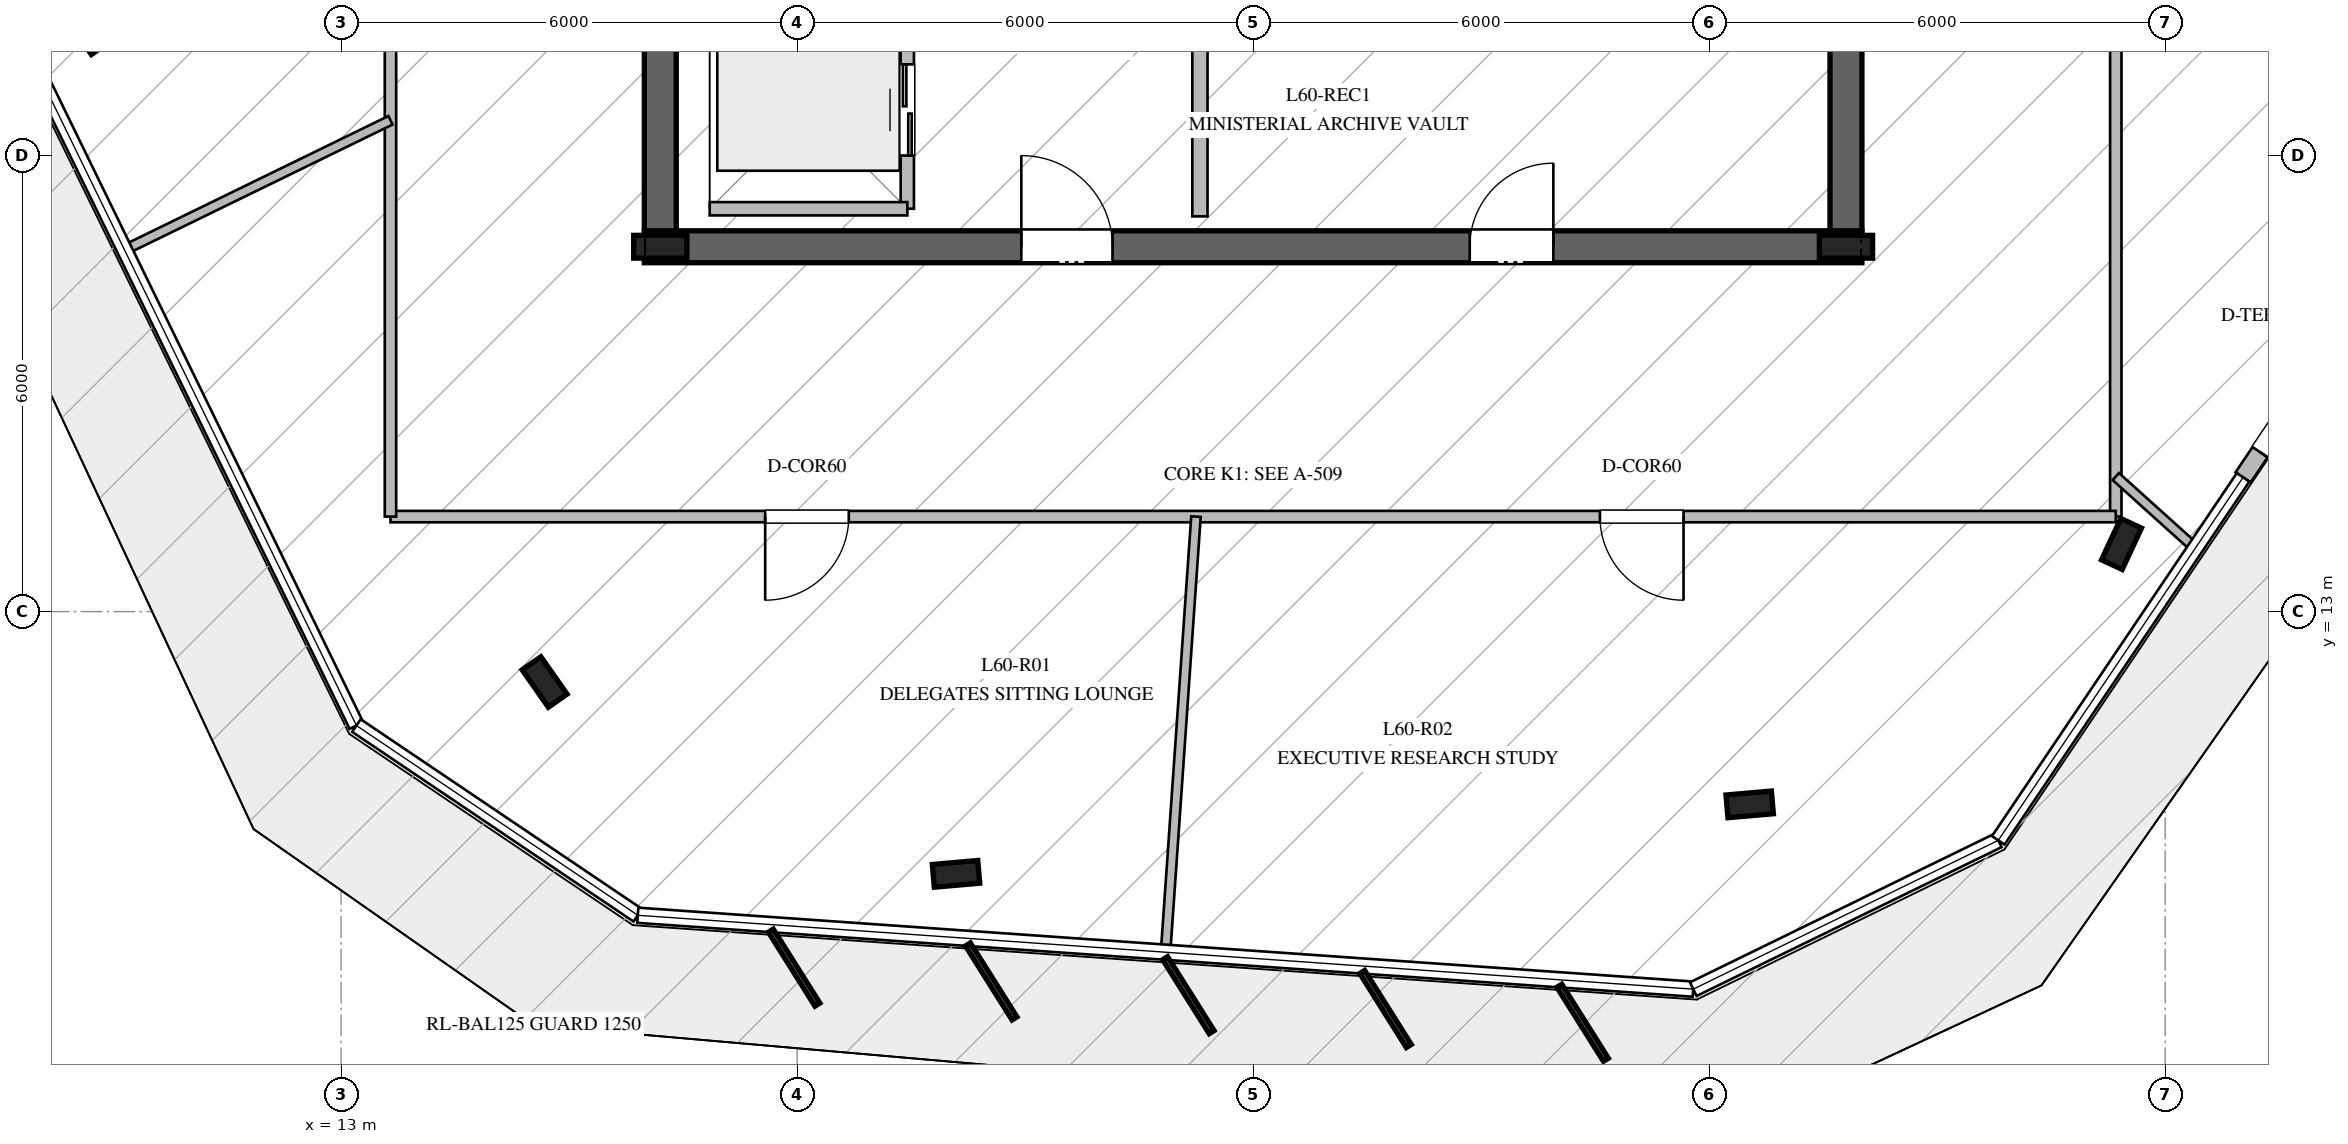
"""IFC4 building model, lengths in metres.
Left out: names, types, materials, properties, quantities, classifications, styles, units other than length and angle.
Written with IfcOpenShell. Run it as: python <this file> out.ifc"""

import sys

from ifc_helpers import new_model, si_unit, direction, frame, frame_2d, origin, origin_2d, place, context, subcontext, project, spatial, rectangle, i_section, extrude, element, fill, save


model = new_model("IFC4")
c1 = context("Model", 3, precision=1e-05, world=origin(), true_north=direction((0.0, 1.0)))
c2 = subcontext(c1, "Body", "Model", "MODEL_VIEW")
j1 = project(units=[si_unit("LENGTHUNIT", "METRE"), si_unit("PLANEANGLEUNIT", "RADIAN")], contexts=[c1])
p1 = place(None, origin())
s1 = spatial("IfcSite", under=j1, at=p1, CompositionType="ELEMENT")
p2 = place(p1, origin())
s2 = spatial("IfcBuilding", under=s1, at=p2, CompositionType="ELEMENT")
p3 = place(p2, frame((0.0, 0.0, 250.2)))
s3 = spatial("IfcBuildingStorey", under=s2, at=p3, CompositionType="ELEMENT", Elevation=250.2)
p4 = place(p3, frame((16.99, 17.8, 0.0), z_axis=(0.0, 0.0, 1.0), x_axis=(1.0, 0.0, 0.0)))
e1 = element("IfcWall", 1, at=p4, inside=s3, PredefinedType="SHEAR", context=c2, shape_type="SweptSolid", body=[
    extrude(rectangle(XDim=16.02, YDim=0.42, at=frame_2d((8.01, 0.0))), origin(), (0.0, 0.0, 1.0), 3.78),
])
p5 = place(p4, frame((4.96, 0.0, 0.0)))
e2 = element("IfcOpeningElement", 2, at=p5, cuts=e1, PredefinedType="OPENING", context=c2, shape_type="SweptSolid", body=[
    extrude(rectangle(XDim=1.2, YDim=2.25, at=frame_2d((0.6, 1.125))), frame((0.0, 0.22, 0.0), z_axis=(0.0, -1.0, 0.0), x_axis=(1.0, 0.0, 0.0)), (0.0, 0.0, 1.0), 0.44),
])
p6 = place(p4, frame((10.86, 0.0, 0.0)))
e3 = element("IfcOpeningElement", 3, at=p6, cuts=e1, PredefinedType="OPENING", context=c2, shape_type="SweptSolid", body=[
    extrude(rectangle(XDim=1.1, YDim=2.2, at=frame_2d((0.55, 1.1))), frame((0.0, 0.22, 0.0), z_axis=(0.0, -1.0, 0.0), x_axis=(1.0, 0.0, 0.0)), (0.0, 0.0, 1.0), 0.44),
])
p7 = place(p3, frame((17.2, 31.99, 0.0), z_axis=(0.0, 0.0, 1.0), x_axis=(0.0, -1.0, 0.0)))
e4 = element("IfcWall", 4, at=p7, inside=s3, PredefinedType="SHEAR", context=c2, shape_type="SweptSolid", body=[
    extrude(rectangle(XDim=13.98, YDim=0.42, at=frame_2d((6.99, 0.0))), origin(), (0.0, 0.0, 1.0), 3.78),
])
p8 = place(p7, frame((2.14, 0.0, 0.0)))
e5 = element("IfcOpeningElement", 5, at=p8, cuts=e4, PredefinedType="OPENING", context=c2, shape_type="SweptSolid", body=[
    extrude(rectangle(XDim=1.5, YDim=2.2, at=frame_2d((0.75, 1.1))), frame((0.0, 0.22, 0.0), z_axis=(0.0, -1.0, 0.0), x_axis=(1.0, 0.0, 0.0)), (0.0, 0.0, 1.0), 0.44),
])
p9 = place(p3, frame((32.8, 18.01, 0.0), z_axis=(0.0, 0.0, 1.0), x_axis=(0.0, 1.0, 0.0)))
e6 = element("IfcWall", 6, at=p9, inside=s3, PredefinedType="SHEAR", context=c2, shape_type="SweptSolid", body=[
    extrude(rectangle(XDim=13.98, YDim=0.42, at=frame_2d((6.99, 0.0))), origin(), (0.0, 0.0, 1.0), 3.78),
])
for number, where, z_axis, x_axis in (
    (7, (17.2, 17.8, 0.0), (0.0, 0.0, 1.0), (1.0, 0.0, 0.0)),
    (8, (32.8, 17.8, 0.0), (0.0, 0.0, 1.0), (1.0, 0.0, 0.0)),
):
    element("IfcColumn", number, at=place(p3, frame(where, z_axis=z_axis, x_axis=x_axis)), inside=s3, PredefinedType="COLUMN", context=c2, shape_type="SweptSolid", body=[
        extrude(i_section(OverallWidth=0.3, OverallDepth=0.7, WebThickness=0.017, FlangeThickness=0.032, at=origin_2d()), origin(), (0.0, 0.0, 1.0), 4.0),
    ])
for number, where, z_axis, x_axis in (
    (9, (15.678, 12.074, -0.27), (0.0, 0.0, 1.0), (-0.574, 0.819, 0.0)),
    (10, (21.091, 9.55, -0.27), (0.0, 0.0, 1.0), (0.996, 0.087, 0.0)),
    (11, (31.533, 10.464, -0.27), (0.0, 0.0, 1.0), (0.996, 0.087, 0.0)),
    (12, (36.425, 13.89, -0.27), (0.0, 0.0, 1.0), (0.423, 0.906, 0.0)),
):
    element("IfcColumn", number, at=place(p3, frame(where, z_axis=z_axis, x_axis=x_axis)), inside=s3, PredefinedType="COLUMN", context=c2, shape_type="SweptSolid", body=[
        extrude(i_section(OverallWidth=0.3, OverallDepth=0.6, WebThickness=0.015, FlangeThickness=0.03, at=origin_2d()), origin(), (0.0, 0.0, 1.0), 4.27),
    ])
p10 = place(p3, frame((38.025, 14.766, 0.0), z_axis=(0.0, 0.0, 1.0), x_axis=(0.559128660759, 0.82908090119, 0.0)))
e13 = element("IfcWall", 13, at=p10, inside=s3, PredefinedType="STANDARD", context=c2, shape_type="SweptSolid", body=[
    extrude(rectangle(XDim=2.4, YDim=0.24, at=frame_2d((1.2, 0.0))), origin(), (0.0, 0.0, 1.0), 3.78),
])
p11 = place(p10, frame((0.4, 0.0, 0.0)))
e14 = element("IfcOpeningElement", 14, at=p11, cuts=e13, PredefinedType="OPENING", context=c2, shape_type="SweptSolid", body=[
    extrude(rectangle(XDim=1.6, YDim=2.25, at=frame_2d((0.8, 1.125))), frame((0.0, 0.13, 0.0), z_axis=(0.0, -1.0, 0.0), x_axis=(1.0, 0.0, 0.0)), (0.0, 0.0, 1.0), 0.26),
])
p12 = place(p3, frame((24.3, 18.2, 0.0), z_axis=(0.0, 0.0, 1.0), x_axis=(0.0, 1.0, 0.0)))
e15 = element("IfcWall", 15, at=p12, inside=s3, PredefinedType="PARTITIONING", context=c2, shape_type="SweptSolid", body=[
    extrude(rectangle(XDim=5.15, YDim=0.2, at=frame_2d((2.575, 0.0))), origin(), (0.0, 0.0, 1.0), 3.78),
])
p13 = place(p3, frame((20.45, 18.3, 0.0), z_axis=(0.0, 0.0, 1.0), x_axis=(0.0, 1.0, 0.0)))
e16 = element("IfcWall", 16, at=p13, inside=s3, PredefinedType="PARTITIONING", context=c2, shape_type="SweptSolid", body=[
    extrude(rectangle(XDim=2.6, YDim=0.175, at=frame_2d((1.3, 0.0))), origin(), (0.0, 0.0, 1.0), 3.78),
])
p14 = place(p13, frame((0.7, 0.0, 0.0)))
e17 = element("IfcOpeningElement", 17, at=p14, cuts=e16, PredefinedType="OPENING", context=c2, shape_type="SweptSolid", body=[
    extrude(rectangle(XDim=1.2, YDim=2.2, at=frame_2d((0.6, 1.1))), frame((0.0, 0.098, 0.0), z_axis=(0.0, -1.0, 0.0), x_axis=(1.0, 0.0, 0.0)), (0.0, 0.0, 1.0), 0.195),
])
p15 = place(p3, frame((17.85, 18.3, 0.0), z_axis=(0.0, 0.0, 1.0), x_axis=(1.0, 0.0, 0.0)))
e18 = element("IfcWall", 18, at=p15, inside=s3, PredefinedType="PARTITIONING", context=c2, shape_type="SweptSolid", body=[
    extrude(rectangle(XDim=2.6, YDim=0.175, at=frame_2d((1.3, 0.0))), origin(), (0.0, 0.0, 1.0), 3.78),
])
p16 = place(p3, frame((36.35, 35.75, 0.0), z_axis=(0.0, 0.0, 1.0), x_axis=(0.0, -1.0, 0.0)))
e19 = element("IfcWall", 19, at=p16, inside=s3, PredefinedType="PARTITIONING", context=c2, shape_type="SweptSolid", body=[
    extrude(rectangle(XDim=21.5, YDim=0.15, at=frame_2d((10.75, 0.0))), origin(), (0.0, 0.0, 1.0), 3.25),
])
p17 = place(p16, frame((13.919, 0.0, 0.0)))
e20 = element("IfcOpeningElement", 20, at=p17, cuts=e19, PredefinedType="OPENING", context=c2, shape_type="SweptSolid", body=[
    extrude(rectangle(XDim=1.1, YDim=2.2, at=frame_2d((0.55, 1.1))), frame((0.0, 0.085, 0.0), z_axis=(0.0, -1.0, 0.0), x_axis=(1.0, 0.0, 0.0)), (0.0, 0.0, 1.0), 0.17),
])
p18 = place(p3, frame((36.35, 14.25, 0.0), z_axis=(0.0, 0.0, 1.0), x_axis=(-1.0, 0.0, 0.0)))
e21 = element("IfcWall", 21, at=p18, inside=s3, PredefinedType="PARTITIONING", context=c2, shape_type="SweptSolid", body=[
    extrude(rectangle(XDim=22.7, YDim=0.15, at=frame_2d((11.35, 0.0))), origin(), (0.0, 0.0, 1.0), 3.28),
])
p19 = place(p18, frame((16.67, 0.0, 0.0)))
e22 = element("IfcOpeningElement", 22, at=p19, cuts=e21, PredefinedType="OPENING", context=c2, shape_type="SweptSolid", body=[
    extrude(rectangle(XDim=1.1, YDim=2.2, at=frame_2d((0.55, 1.1))), frame((0.0, 0.085, 0.0), z_axis=(0.0, -1.0, 0.0), x_axis=(1.0, 0.0, 0.0)), (0.0, 0.0, 1.0), 0.17),
])
p20 = place(p18, frame((5.687, 0.0, 0.0)))
e23 = element("IfcOpeningElement", 23, at=p20, cuts=e21, PredefinedType="OPENING", context=c2, shape_type="SweptSolid", body=[
    extrude(rectangle(XDim=1.1, YDim=2.2, at=frame_2d((0.55, 1.1))), frame((0.0, 0.085, 0.0), z_axis=(0.0, -1.0, 0.0), x_axis=(1.0, 0.0, 0.0)), (0.0, 0.0, 1.0), 0.17),
])
p21 = place(p3, frame((13.65, 14.25, 0.0), z_axis=(0.0, 0.0, 1.0), x_axis=(0.0, 1.0, 0.0)))
e24 = element("IfcWall", 24, at=p21, inside=s3, PredefinedType="PARTITIONING", context=c2, shape_type="SweptSolid", body=[
    extrude(rectangle(XDim=21.5, YDim=0.15, at=frame_2d((10.75, 0.0))), origin(), (0.0, 0.0, 1.0), 3.25),
])
p22 = place(p21, frame((10.11, 0.0, 0.0)))
e25 = element("IfcOpeningElement", 25, at=p22, cuts=e24, PredefinedType="OPENING", context=c2, shape_type="SweptSolid", body=[
    extrude(rectangle(XDim=1.1, YDim=2.2, at=frame_2d((0.55, 1.1))), frame((0.0, 0.085, 0.0), z_axis=(0.0, -1.0, 0.0), x_axis=(1.0, 0.0, 0.0)), (0.0, 0.0, 1.0), 0.17),
])
p23 = place(p3, frame((13.65, 19.464, 0.0), z_axis=(0.0, 0.0, 1.0), x_axis=(-0.898841056679, -0.438274748107, 0.0)))
e26 = element("IfcWall", 26, at=p23, inside=s3, PredefinedType="PARTITIONING", context=c2, shape_type="SweptSolid", body=[
    extrude(rectangle(XDim=3.877, YDim=0.125, at=frame_2d((1.938, 0.0))), origin(), (0.0, 0.0, 1.0), 3.25),
])
p24 = place(p3, frame((24.248, 14.25, 0.0), z_axis=(0.0, 0.0, 1.0), x_axis=(-0.069632781352, -0.997572691968, 0.0)))
e27 = element("IfcWall", 27, at=p24, inside=s3, PredefinedType="PARTITIONING", context=c2, shape_type="SweptSolid", body=[
    extrude(rectangle(XDim=5.729, YDim=0.125, at=frame_2d((2.865, 0.0))), origin(), (0.0, 0.0, 1.0), 3.28),
])
p25 = place(p3, frame((36.35, 14.777, 0.0), z_axis=(0.0, 0.0, 1.0), x_axis=(0.743041331361, -0.669245530346, 0.0)))
e28 = element("IfcWall", 28, at=p25, inside=s3, PredefinedType="PARTITIONING", context=c2, shape_type="SweptSolid", body=[
    extrude(rectangle(XDim=1.393, YDim=0.125, at=frame_2d((0.696, 0.0))), origin(), (0.0, 0.0, 1.0), 3.28),
])
p26 = place(p11, frame((1.6, 0.0, 0.0), z_axis=(0.0, 0.0, 1.0), x_axis=(-1.0, 0.0, 0.0)))
e29 = element("IfcDoor", 29, at=p26, inside=s3, OperationType="DOUBLE_DOOR_SINGLE_SWING", PredefinedType="DOOR", context=c2, shape_type="SweptSolid", body=[
    extrude(rectangle(XDim=1.6, YDim=2.25, at=frame_2d((0.8, 1.125))), frame((0.0, 0.025, 0.0), z_axis=(0.0, -1.0, 0.0), x_axis=(1.0, 0.0, 0.0)), (0.0, 0.0, 1.0), 0.05),
])
fill(e14, e29)
p27 = place(p5, origin())
e30 = element("IfcDoor", 30, at=p27, inside=s3, OperationType="SINGLE_SWING_LEFT", PredefinedType="DOOR", context=c2, shape_type="SweptSolid", body=[
    extrude(rectangle(XDim=1.2, YDim=2.25, at=frame_2d((0.6, 1.125))), frame((0.0, 0.025, 0.0), z_axis=(0.0, -1.0, 0.0), x_axis=(1.0, 0.0, 0.0)), (0.0, 0.0, 1.0), 0.05),
])
fill(e2, e30)
p28 = place(p6, origin())
e31 = element("IfcDoor", 31, at=p28, inside=s3, OperationType="SINGLE_SWING_RIGHT", PredefinedType="DOOR", context=c2, shape_type="SweptSolid", body=[
    extrude(rectangle(XDim=1.1, YDim=2.2, at=frame_2d((0.55, 1.1))), frame((0.0, 0.025, 0.0), z_axis=(0.0, -1.0, 0.0), x_axis=(1.0, 0.0, 0.0)), (0.0, 0.0, 1.0), 0.05),
])
fill(e3, e31)
p29 = place(p14, origin())
e32 = element("IfcDoor", 32, at=p29, inside=s3, OperationType="DOUBLE_DOOR_SLIDING", PredefinedType="DOOR", context=c2, shape_type="SweptSolid", body=[
    extrude(rectangle(XDim=1.2, YDim=2.2, at=frame_2d((0.6, 1.1))), frame((0.0, 0.025, 0.0), z_axis=(0.0, -1.0, 0.0), x_axis=(1.0, 0.0, 0.0)), (0.0, 0.0, 1.0), 0.05),
])
fill(e17, e32)
p30 = place(p19, origin())
e33 = element("IfcDoor", 33, at=p30, inside=s3, OperationType="SINGLE_SWING_RIGHT", PredefinedType="DOOR", context=c2, shape_type="SweptSolid", body=[
    extrude(rectangle(XDim=1.1, YDim=2.2, at=frame_2d((0.55, 1.1))), frame((0.0, 0.025, 0.0), z_axis=(0.0, -1.0, 0.0), x_axis=(1.0, 0.0, 0.0)), (0.0, 0.0, 1.0), 0.05),
])
fill(e22, e33)
p31 = place(p20, origin())
e34 = element("IfcDoor", 34, at=p31, inside=s3, OperationType="SINGLE_SWING_LEFT", PredefinedType="DOOR", context=c2, shape_type="SweptSolid", body=[
    extrude(rectangle(XDim=1.1, YDim=2.2, at=frame_2d((0.55, 1.1))), frame((0.0, 0.025, 0.0), z_axis=(0.0, -1.0, 0.0), x_axis=(1.0, 0.0, 0.0)), (0.0, 0.0, 1.0), 0.05),
])
fill(e23, e34)
save(model, sys.argv[1])
